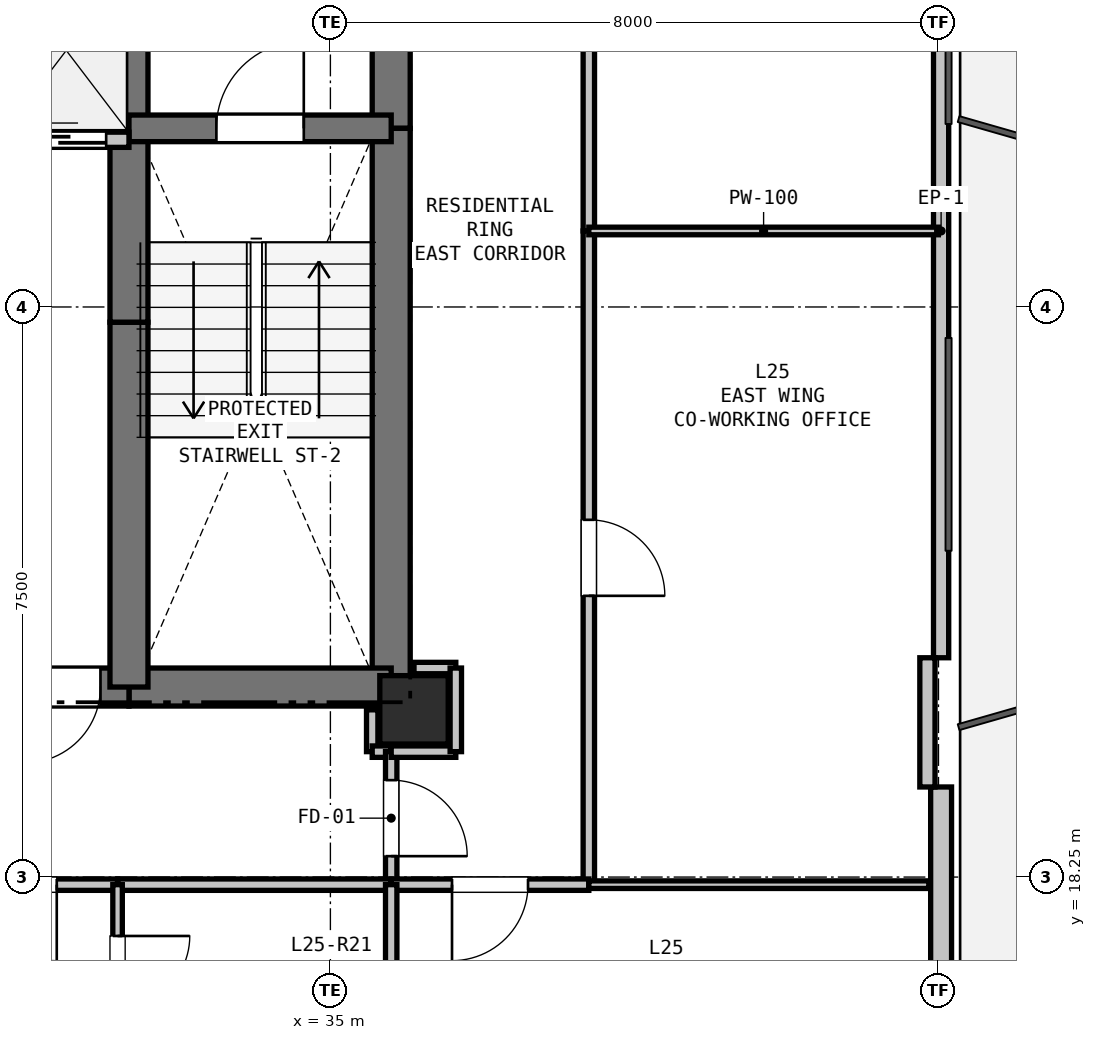
"""IFC4 building model, lengths in metres.
Left out: names, types, materials, properties, quantities, classifications, styles, units other than length and angle.
Written with IfcOpenShell. Run it as: python <this file> out.ifc"""

import sys

from ifc_helpers import new_model, si_unit, direction, frame, frame_2d, origin, origin_2d, place, context, subcontext, project, spatial, rectangle, extrude, element, fill, save


model = new_model("IFC4")
c1 = context("Model", 3, precision=1e-05, world=origin(), true_north=direction((0.0, 1.0)))
c2 = subcontext(c1, "Body", "Model", "MODEL_VIEW")
j1 = project(units=[si_unit("LENGTHUNIT", "METRE"), si_unit("PLANEANGLEUNIT", "RADIAN")], contexts=[c1])
p1 = place(None, origin())
s1 = spatial("IfcSite", under=j1, at=p1, CompositionType="ELEMENT")
p2 = place(p1, origin())
s2 = spatial("IfcBuilding", under=s1, at=p2, CompositionType="ELEMENT")
p3 = place(p2, frame((0.0, 0.0, 93.3)))
s3 = spatial("IfcBuildingStorey", under=s2, at=p3, CompositionType="ELEMENT", Elevation=93.3)
p4 = place(p3, frame((36.1, 20.45, 0.0), z_axis=(0.0, 0.0, 1.0), x_axis=(1.0, 0.0, 0.0)))
e1 = element("IfcColumn", 1, at=p4, inside=s3, PredefinedType="COLUMN", context=c2, shape_type="SweptSolid", body=[
    extrude(rectangle(XDim=0.9, YDim=0.9, at=origin_2d()), origin(), (0.0, 0.0, 1.0), 3.3),
])
p5 = place(p3, frame((43.035, 32.365, 0.0), z_axis=(0.0, 0.0, 1.0), x_axis=(0.0, -1.0, 0.0)))
e2 = element("IfcWall", 2, at=p5, inside=s3, PredefinedType="PARAPET", context=c2, shape_type="SweptSolid", body=[
    extrude(rectangle(XDim=11.229, YDim=0.2, at=frame_2d((5.615, 0.0))), origin(), (0.0, 0.0, 1.0), 0.2),
])
p6 = place(p3, frame((43.035, 19.435, 0.0), z_axis=(0.0, 0.0, 1.0), x_axis=(0.0, -1.0, 0.0)))
e3 = element("IfcWall", 3, at=p6, inside=s3, PredefinedType="SOLIDWALL", context=c2, shape_type="SweptSolid", body=[
    extrude(rectangle(XDim=11.93, YDim=0.275, at=frame_2d((5.965, 0.0))), origin(), (0.0, 0.0, 1.0), 2.67),
])
p7 = place(p6, frame((7.119, 0.0, 0.9)))
e4 = element("IfcOpeningElement", 4, at=p7, cuts=e3, PredefinedType="OPENING", context=c2, shape_type="SweptSolid", body=[
    extrude(rectangle(XDim=1.2, YDim=1.4, at=frame_2d((0.6, 0.7))), frame((0.0, 0.147, 0.0), z_axis=(0.0, -1.0, 0.0), x_axis=(1.0, 0.0, 0.0)), (0.0, 0.0, 1.0), 0.295),
])
p8 = place(p3, frame((42.854, 21.135, 0.0), z_axis=(0.0, 0.0, 1.0), x_axis=(0.0, -1.0, 0.0)))
e5 = element("IfcWall", 5, at=p8, inside=s3, PredefinedType="PARAPET", context=c2, shape_type="SweptSolid", body=[
    extrude(rectangle(XDim=1.7, YDim=0.2, at=frame_2d((0.85, 0.0))), origin(), (0.0, 0.0, 1.0), 2.67),
])
p9 = place(p3, frame((35.8, 32.75, 0.0), z_axis=(0.0, 0.0, 1.0), x_axis=(0.0, -1.0, 0.0)))
e6 = element("IfcWall", 6, at=p9, inside=s3, PredefinedType="SHEAR", context=c2, shape_type="SweptSolid", body=[
    extrude(rectangle(XDim=4.65, YDim=0.5, at=frame_2d((2.325, 0.0))), origin(), (0.0, 0.0, 1.0), 3.05),
])
p10 = place(p3, frame((35.8, 28.1, 0.0), z_axis=(0.0, 0.0, 1.0), x_axis=(0.0, -1.0, 0.0)))
e7 = element("IfcWall", 7, at=p10, inside=s3, PredefinedType="SHEAR", context=c2, shape_type="SweptSolid", body=[
    extrude(rectangle(XDim=7.35, YDim=0.5, at=frame_2d((3.675, 0.0))), origin(), (0.0, 0.0, 1.0), 3.05),
])
p11 = place(p3, frame((35.8, 20.75, 0.0), z_axis=(0.0, 0.0, 1.0), x_axis=(-1.0, 0.0, 0.0)))
e8 = element("IfcWall", 8, at=p11, inside=s3, PredefinedType="SHEAR", context=c2, shape_type="SweptSolid", body=[
    extrude(rectangle(XDim=3.45, YDim=0.5, at=frame_2d((1.725, 0.0))), origin(), (0.0, 0.0, 1.0), 3.05),
])
p12 = place(p3, frame((32.35, 20.75, 0.0), z_axis=(0.0, 0.0, 1.0), x_axis=(-1.0, 0.0, 0.0)))
e9 = element("IfcWall", 9, at=p12, inside=s3, PredefinedType="SHEAR", context=c2, shape_type="SweptSolid", body=[
    extrude(rectangle(XDim=1.75, YDim=0.5, at=frame_2d((0.875, 0.0))), origin(), (0.0, 0.0, 1.0), 3.05),
])
p13 = place(p12, frame((0.375, 0.0, 0.0)))
e10 = element("IfcOpeningElement", 10, at=p13, cuts=e9, PredefinedType="OPENING", context=c2, shape_type="SweptSolid", body=[
    extrude(rectangle(XDim=1.0, YDim=2.15, at=frame_2d((0.5, 1.075))), frame((0.0, 0.26, 0.0), z_axis=(0.0, -1.0, 0.0), x_axis=(1.0, 0.0, 0.0)), (0.0, 0.0, 1.0), 0.52),
])
p14 = place(p3, frame((32.35, 20.75, 0.0), z_axis=(0.0, 0.0, 1.0), x_axis=(0.0, 1.0, 0.0)))
e11 = element("IfcWall", 11, at=p14, inside=s3, PredefinedType="SHEAR", context=c2, shape_type="SweptSolid", body=[
    extrude(rectangle(XDim=4.8, YDim=0.5, at=frame_2d((2.4, 0.0))), origin(), (0.0, 0.0, 1.0), 3.05),
])
p15 = place(p3, frame((32.35, 25.55, 0.0), z_axis=(0.0, 0.0, 1.0), x_axis=(0.0, 1.0, 0.0)))
e12 = element("IfcWall", 12, at=p15, inside=s3, PredefinedType="SHEAR", context=c2, shape_type="SweptSolid", body=[
    extrude(rectangle(XDim=2.4, YDim=0.5, at=frame_2d((1.2, 0.0))), origin(), (0.0, 0.0, 1.0), 3.05),
])
p16 = place(p3, frame((32.35, 27.95, 0.0), z_axis=(0.0, 0.0, 1.0), x_axis=(0.0, 1.0, 0.0)))
e13 = element("IfcWall", 13, at=p16, inside=s3, PredefinedType="SHEAR", context=c2, shape_type="SweptSolid", body=[
    extrude(rectangle(XDim=2.8, YDim=0.5, at=frame_2d((1.4, 0.0))), origin(), (0.0, 0.0, 1.0), 3.05),
])
p17 = place(p3, frame((32.35, 28.1, 0.0), z_axis=(0.0, 0.0, 1.0), x_axis=(1.0, 0.0, 0.0)))
e14 = element("IfcWall", 14, at=p17, inside=s3, PredefinedType="SHEAR", context=c2, shape_type="SweptSolid", body=[
    extrude(rectangle(XDim=3.45, YDim=0.35, at=frame_2d((1.725, 0.0))), origin(), (0.0, 0.0, 1.0), 3.05),
])
p18 = place(p17, frame((1.15, 0.0, 0.0)))
e15 = element("IfcOpeningElement", 15, at=p18, cuts=e14, PredefinedType="OPENING", context=c2, shape_type="SweptSolid", body=[
    extrude(rectangle(XDim=1.15, YDim=2.15, at=frame_2d((0.575, 1.075))), frame((0.0, 0.185, 0.0), z_axis=(0.0, -1.0, 0.0), x_axis=(1.0, 0.0, 0.0)), (0.0, 0.0, 1.0), 0.37),
])
p19 = place(p3, frame((27.4, 27.95, 0.0), z_axis=(0.0, 0.0, 1.0), x_axis=(1.0, 0.0, 0.0)))
e16 = element("IfcWall", 16, at=p19, inside=s3, PredefinedType="PARTITIONING", context=c2, shape_type="SweptSolid", body=[
    extrude(rectangle(XDim=4.95, YDim=0.2, at=frame_2d((2.475, 0.0))), origin(), (0.0, 0.0, 1.0), 3.05),
])
p20 = place(p19, frame((0.25, 0.0, 0.0)))
e17 = element("IfcOpeningElement", 17, at=p20, cuts=e16, PredefinedType="OPENING", context=c2, shape_type="SweptSolid", body=[
    extrude(rectangle(XDim=1.1, YDim=2.15, at=frame_2d((0.55, 1.075))), frame((0.0, 0.11, 0.0), z_axis=(0.0, -1.0, 0.0), x_axis=(1.0, 0.0, 0.0)), (0.0, 0.0, 1.0), 0.22),
])
p21 = place(p19, frame((1.9, 0.0, 0.0)))
e18 = element("IfcOpeningElement", 18, at=p21, cuts=e16, PredefinedType="OPENING", context=c2, shape_type="SweptSolid", body=[
    extrude(rectangle(XDim=1.1, YDim=2.15, at=frame_2d((0.55, 1.075))), frame((0.0, 0.11, 0.0), z_axis=(0.0, -1.0, 0.0), x_axis=(1.0, 0.0, 0.0)), (0.0, 0.0, 1.0), 0.22),
])
p22 = place(p19, frame((3.55, 0.0, 0.0)))
e19 = element("IfcOpeningElement", 19, at=p22, cuts=e16, PredefinedType="OPENING", context=c2, shape_type="SweptSolid", body=[
    extrude(rectangle(XDim=1.1, YDim=2.15, at=frame_2d((0.55, 1.075))), frame((0.0, 0.11, 0.0), z_axis=(0.0, -1.0, 0.0), x_axis=(1.0, 0.0, 0.0)), (0.0, 0.0, 1.0), 0.22),
])
p23 = place(p3, frame((35.55, 20.45, 0.0), z_axis=(0.0, 0.0, 1.0), x_axis=(0.0, -1.0, 0.0)))
e20 = element("IfcWall", 20, at=p23, inside=s3, PredefinedType="PARTITIONING", context=c2, shape_type="SweptSolid", body=[
    extrude(rectangle(XDim=0.55, YDim=0.15, at=frame_2d((0.275, 0.0))), origin(), (0.0, 0.0, 1.0), 2.498),
])
p24 = place(p3, frame((35.55, 19.9, 0.0), z_axis=(0.0, 0.0, 1.0), x_axis=(1.0, 0.0, 0.0)))
e21 = element("IfcWall", 21, at=p24, inside=s3, PredefinedType="PARTITIONING", context=c2, shape_type="SweptSolid", body=[
    extrude(rectangle(XDim=0.25, YDim=0.15, at=frame_2d((0.125, 0.0))), origin(), (0.0, 0.0, 1.0), 3.05),
])
p25 = place(p3, frame((35.8, 19.9, 0.0), z_axis=(0.0, 0.0, 1.0), x_axis=(0.0, -1.0, 0.0)))
e22 = element("IfcWall", 22, at=p25, inside=s3, PredefinedType="PARTITIONING", context=c2, shape_type="SweptSolid", body=[
    extrude(rectangle(XDim=1.75, YDim=0.15, at=frame_2d((0.875, 0.0))), origin(), (0.0, 0.0, 1.0), 3.05),
])
p26 = place(p25, frame((0.375, 0.0, 0.0)))
e23 = element("IfcOpeningElement", 23, at=p26, cuts=e22, PredefinedType="OPENING", context=c2, shape_type="SweptSolid", body=[
    extrude(rectangle(XDim=1.0, YDim=2.15, at=frame_2d((0.5, 1.075))), frame((0.0, 0.085, 0.0), z_axis=(0.0, -1.0, 0.0), x_axis=(1.0, 0.0, 0.0)), (0.0, 0.0, 1.0), 0.17),
])
p27 = place(p3, frame((35.8, 18.15, 0.0), z_axis=(0.0, 0.0, 1.0), x_axis=(-1.0, 0.0, 0.0)))
e24 = element("IfcWall", 24, at=p27, inside=s3, PredefinedType="PARTITIONING", context=c2, shape_type="SweptSolid", body=[
    extrude(rectangle(XDim=3.6, YDim=0.15, at=frame_2d((1.8, 0.0))), origin(), (0.0, 0.0, 1.0), 3.05),
])
p28 = place(p3, frame((32.2, 18.15, 0.0), z_axis=(0.0, 0.0, 1.0), x_axis=(-1.0, 0.0, 0.0)))
e25 = element("IfcWall", 25, at=p28, inside=s3, PredefinedType="PARTITIONING", context=c2, shape_type="SweptSolid", body=[
    extrude(rectangle(XDim=2.6, YDim=0.15, at=frame_2d((1.3, 0.0))), origin(), (0.0, 0.0, 1.0), 3.05),
])
p29 = place(p28, frame((0.8, 0.0, 0.0)))
e26 = element("IfcOpeningElement", 26, at=p29, cuts=e25, PredefinedType="OPENING", context=c2, shape_type="SweptSolid", body=[
    extrude(rectangle(XDim=1.0, YDim=2.15, at=frame_2d((0.5, 1.075))), frame((0.0, 0.085, 0.0), z_axis=(0.0, -1.0, 0.0), x_axis=(1.0, 0.0, 0.0)), (0.0, 0.0, 1.0), 0.17),
])
p30 = place(p3, frame((36.65, 21.0, 0.0), z_axis=(0.0, 0.0, 1.0), x_axis=(-1.0, 0.0, 0.0)))
e27 = element("IfcWall", 27, at=p30, inside=s3, PredefinedType="PARTITIONING", context=c2, shape_type="SweptSolid", body=[
    extrude(rectangle(XDim=0.55, YDim=0.15, at=frame_2d((0.275, 0.0))), origin(), (0.0, 0.0, 1.0), 2.498),
])
p31 = place(p3, frame((38.4, 35.35, 0.0), z_axis=(0.0, 0.0, 1.0), x_axis=(0.0, -1.0, 0.0)))
e28 = element("IfcWall", 28, at=p31, inside=s3, PredefinedType="PARTITIONING", context=c2, shape_type="SweptSolid", body=[
    extrude(rectangle(XDim=8.6, YDim=0.15, at=frame_2d((4.3, 0.0))), origin(), (0.0, 0.0, 1.0), 3.05),
])
p32 = place(p31, frame((3.8, 0.0, 0.0)))
e29 = element("IfcOpeningElement", 29, at=p32, cuts=e28, PredefinedType="OPENING", context=c2, shape_type="SweptSolid", body=[
    extrude(rectangle(XDim=1.0, YDim=2.15, at=frame_2d((0.5, 1.075))), frame((0.0, 0.085, 0.0), z_axis=(0.0, -1.0, 0.0), x_axis=(1.0, 0.0, 0.0)), (0.0, 0.0, 1.0), 0.17),
])
p33 = place(p3, frame((38.4, 26.75, 0.0), z_axis=(0.0, 0.0, 1.0), x_axis=(0.0, -1.0, 0.0)))
e30 = element("IfcWall", 30, at=p33, inside=s3, PredefinedType="PARTITIONING", context=c2, shape_type="SweptSolid", body=[
    extrude(rectangle(XDim=8.6, YDim=0.15, at=frame_2d((4.3, 0.0))), origin(), (0.0, 0.0, 1.0), 3.05),
])
p34 = place(p33, frame((3.8, 0.0, 0.0)))
e31 = element("IfcOpeningElement", 31, at=p34, cuts=e30, PredefinedType="OPENING", context=c2, shape_type="SweptSolid", body=[
    extrude(rectangle(XDim=1.0, YDim=2.15, at=frame_2d((0.5, 1.075))), frame((0.0, 0.085, 0.0), z_axis=(0.0, -1.0, 0.0), x_axis=(1.0, 0.0, 0.0)), (0.0, 0.0, 1.0), 0.17),
])
p35 = place(p3, frame((38.4, 18.15, 0.0), z_axis=(0.0, 0.0, 1.0), x_axis=(-1.0, 0.0, 0.0)))
e32 = element("IfcWall", 32, at=p35, inside=s3, PredefinedType="PARTITIONING", context=c2, shape_type="SweptSolid", body=[
    extrude(rectangle(XDim=2.6, YDim=0.15, at=frame_2d((1.3, 0.0))), origin(), (0.0, 0.0, 1.0), 2.423),
])
p36 = place(p35, frame((0.8, 0.0, 0.0)))
e33 = element("IfcOpeningElement", 33, at=p36, cuts=e32, PredefinedType="OPENING", context=c2, shape_type="SweptSolid", body=[
    extrude(rectangle(XDim=1.0, YDim=2.15, at=frame_2d((0.5, 1.075))), frame((0.0, 0.085, 0.0), z_axis=(0.0, -1.0, 0.0), x_axis=(1.0, 0.0, 0.0)), (0.0, 0.0, 1.0), 0.17),
])
p37 = place(p3, frame((35.8, 19.9, 0.0), z_axis=(0.0, 0.0, 1.0), x_axis=(1.0, 0.0, 0.0)))
e34 = element("IfcWall", 34, at=p37, inside=s3, PredefinedType="PARTITIONING", context=c2, shape_type="SweptSolid", body=[
    extrude(rectangle(XDim=0.85, YDim=0.15, at=frame_2d((0.425, 0.0))), origin(), (0.0, 0.0, 1.0), 2.423),
])
p38 = place(p3, frame((36.65, 19.9, 0.0), z_axis=(0.0, 0.0, 1.0), x_axis=(0.0, 1.0, 0.0)))
e35 = element("IfcWall", 35, at=p38, inside=s3, PredefinedType="PARTITIONING", context=c2, shape_type="SweptSolid", body=[
    extrude(rectangle(XDim=1.1, YDim=0.15, at=frame_2d((0.55, 0.0))), origin(), (0.0, 0.0, 1.0), 3.05),
])
p39 = place(p3, frame((32.2, 18.15, 0.0), z_axis=(0.0, 0.0, 1.0), x_axis=(0.0, -1.0, 0.0)))
e36 = element("IfcWall", 36, at=p39, inside=s3, PredefinedType="PARTITIONING", context=c2, shape_type="SweptSolid", body=[
    extrude(rectangle(XDim=2.3, YDim=0.125, at=frame_2d((1.15, 0.0))), origin(), (0.0, 0.0, 1.0), 3.05),
])
p40 = place(p39, frame((0.675, 0.0, 0.0)))
e37 = element("IfcOpeningElement", 37, at=p40, cuts=e36, PredefinedType="OPENING", context=c2, shape_type="SweptSolid", body=[
    extrude(rectangle(XDim=0.95, YDim=2.1, at=frame_2d((0.475, 1.05))), frame((0.0, 0.073, 0.0), z_axis=(0.0, -1.0, 0.0), x_axis=(1.0, 0.0, 0.0)), (0.0, 0.0, 1.0), 0.145),
])
p41 = place(p3, frame((35.8, 18.15, 0.0), z_axis=(0.0, 0.0, 1.0), x_axis=(0.0, -1.0, 0.0)))
e38 = element("IfcWall", 38, at=p41, inside=s3, PredefinedType="PARTITIONING", context=c2, shape_type="SweptSolid", body=[
    extrude(rectangle(XDim=2.3, YDim=0.15, at=frame_2d((1.15, 0.0))), origin(), (0.0, 0.0, 1.0), 3.05),
])
p42 = place(p3, frame((38.4, 18.15, 0.0), z_axis=(0.0, 0.0, 1.0), x_axis=(1.0, 0.0, 0.0)))
e39 = element("IfcWall", 39, at=p42, inside=s3, PredefinedType="PARTITIONING", context=c2, shape_type="SweptSolid", body=[
    extrude(rectangle(XDim=4.473, YDim=0.1, at=frame_2d((2.237, 0.0))), origin(), (0.0, 0.0, 1.0), 2.365),
])
p43 = place(p3, frame((42.999, 26.75, 0.0), z_axis=(0.0, 0.0, 1.0), x_axis=(-1.0, 0.0, 0.0)))
e40 = element("IfcWall", 40, at=p43, inside=s3, PredefinedType="PARTITIONING", context=c2, shape_type="SweptSolid", body=[
    extrude(rectangle(XDim=4.599, YDim=0.1, at=frame_2d((2.299, 0.0))), origin(), (0.0, 0.0, 1.0), 2.365),
])
p44 = place(p22, origin())
e41 = element("IfcDoor", 41, at=p44, inside=s3, OperationType="SLIDING_TO_LEFT", PredefinedType="DOOR", context=c2, shape_type="SweptSolid", body=[
    extrude(rectangle(XDim=1.1, YDim=2.15, at=frame_2d((0.55, 1.075))), frame((0.0, 0.025, 0.0), z_axis=(0.0, -1.0, 0.0), x_axis=(1.0, 0.0, 0.0)), (0.0, 0.0, 1.0), 0.05),
])
fill(e19, e41)
p45 = place(p13, origin())
e42 = element("IfcDoor", 42, at=p45, inside=s3, OperationType="SINGLE_SWING_RIGHT", PredefinedType="DOOR", context=c2, shape_type="SweptSolid", body=[
    extrude(rectangle(XDim=1.0, YDim=2.15, at=frame_2d((0.5, 1.075))), frame((0.0, 0.025, 0.0), z_axis=(0.0, -1.0, 0.0), x_axis=(1.0, 0.0, 0.0)), (0.0, 0.0, 1.0), 0.05),
])
fill(e10, e42)
p46 = place(p18, origin())
e43 = element("IfcDoor", 43, at=p46, inside=s3, OperationType="SINGLE_SWING_RIGHT", PredefinedType="DOOR", context=c2, shape_type="SweptSolid", body=[
    extrude(rectangle(XDim=1.15, YDim=2.15, at=frame_2d((0.575, 1.075))), frame((0.0, 0.025, 0.0), z_axis=(0.0, -1.0, 0.0), x_axis=(1.0, 0.0, 0.0)), (0.0, 0.0, 1.0), 0.05),
])
fill(e15, e43)
p47 = place(p26, origin())
e44 = element("IfcDoor", 44, at=p47, inside=s3, OperationType="SINGLE_SWING_RIGHT", PredefinedType="DOOR", context=c2, shape_type="SweptSolid", body=[
    extrude(rectangle(XDim=1.0, YDim=2.15, at=frame_2d((0.5, 1.075))), frame((0.0, 0.025, 0.0), z_axis=(0.0, -1.0, 0.0), x_axis=(1.0, 0.0, 0.0)), (0.0, 0.0, 1.0), 0.05),
])
fill(e23, e44)
p48 = place(p29, origin())
e45 = element("IfcDoor", 45, at=p48, inside=s3, OperationType="SINGLE_SWING_LEFT", PredefinedType="DOOR", context=c2, shape_type="SweptSolid", body=[
    extrude(rectangle(XDim=1.0, YDim=2.15, at=frame_2d((0.5, 1.075))), frame((0.0, 0.025, 0.0), z_axis=(0.0, -1.0, 0.0), x_axis=(1.0, 0.0, 0.0)), (0.0, 0.0, 1.0), 0.05),
])
fill(e26, e45)
p49 = place(p36, origin())
e46 = element("IfcDoor", 46, at=p49, inside=s3, OperationType="SINGLE_SWING_RIGHT", PredefinedType="DOOR", context=c2, shape_type="SweptSolid", body=[
    extrude(rectangle(XDim=1.0, YDim=2.15, at=frame_2d((0.5, 1.075))), frame((0.0, 0.025, 0.0), z_axis=(0.0, -1.0, 0.0), x_axis=(1.0, 0.0, 0.0)), (0.0, 0.0, 1.0), 0.05),
])
fill(e33, e46)
p50 = place(p34, origin())
e47 = element("IfcDoor", 47, at=p50, inside=s3, OperationType="SINGLE_SWING_RIGHT", PredefinedType="DOOR", context=c2, shape_type="SweptSolid", body=[
    extrude(rectangle(XDim=1.0, YDim=2.15, at=frame_2d((0.5, 1.075))), frame((0.0, 0.025, 0.0), z_axis=(0.0, -1.0, 0.0), x_axis=(1.0, 0.0, 0.0)), (0.0, 0.0, 1.0), 0.05),
])
fill(e31, e47)
p51 = place(p40, origin())
e48 = element("IfcDoor", 48, at=p51, inside=s3, OperationType="SINGLE_SWING_LEFT", PredefinedType="DOOR", context=c2, shape_type="SweptSolid", body=[
    extrude(rectangle(XDim=0.95, YDim=2.1, at=frame_2d((0.475, 1.05))), frame((0.0, 0.025, 0.0), z_axis=(0.0, -1.0, 0.0), x_axis=(1.0, 0.0, 0.0)), (0.0, 0.0, 1.0), 0.05),
])
fill(e37, e48)
save(model, sys.argv[1])
